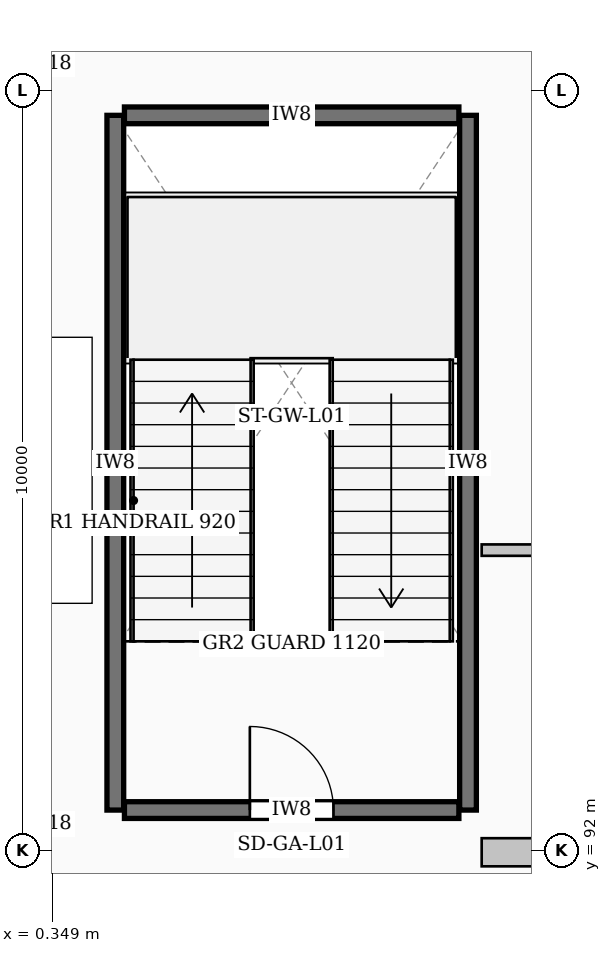
"""IFC4 building model, lengths in metres.
Left out: names, types, materials, properties, quantities, classifications, styles, units other than length and angle.
Written with IfcOpenShell. Run it as: python <this file> out.ifc"""

import sys

from ifc_helpers import new_model, si_unit, direction, frame, frame_2d, origin, place, context, subcontext, project, spatial, rectangle, extrude, element, fill, save


model = new_model("IFC4")
c1 = context("Model", 3, precision=1e-05, world=origin(), true_north=direction((0.0, 1.0)))
c2 = subcontext(c1, "Body", "Model", "MODEL_VIEW")
j1 = project(units=[si_unit("LENGTHUNIT", "METRE"), si_unit("PLANEANGLEUNIT", "RADIAN")], contexts=[c1])
p1 = place(None, origin())
s1 = spatial("IfcSite", under=j1, at=p1, CompositionType="ELEMENT")
p2 = place(p1, origin())
s2 = spatial("IfcBuilding", under=s1, at=p2, CompositionType="ELEMENT")
p3 = place(p2, frame((0.0, 0.0, 4.8)))
s3 = spatial("IfcBuildingStorey", under=s2, at=p3, CompositionType="ELEMENT", Elevation=4.8)
for number, where, z_axis, x_axis in (
    (1, (1.18, 92.53, 0.0), (0.0, 0.0, 1.0), (0.0, 1.0, 0.0)),
    (2, (5.82, 92.53, 0.0), (0.0, 0.0, 1.0), (0.0, 1.0, 0.0)),
):
    element("IfcWall", number, at=place(p3, frame(where, z_axis=z_axis, x_axis=x_axis)), inside=s3, PredefinedType="SHEAR", context=c2, shape_type="SweptSolid", body=[
        extrude(rectangle(XDim=9.14, YDim=0.22, at=frame_2d((4.57, 0.0))), origin(), (0.0, 0.0, 1.0), 4.56),
    ])
p4 = place(p3, frame((1.3, 101.67, 0.0), z_axis=(0.0, 0.0, 1.0), x_axis=(1.0, 0.0, 0.0)))
e3 = element("IfcWall", 3, at=p4, inside=s3, PredefinedType="SHEAR", context=c2, shape_type="SweptSolid", body=[
    extrude(rectangle(XDim=4.4, YDim=0.22, at=frame_2d((2.2, 0.0))), origin(), (0.0, 0.0, 1.0), 4.56),
])
p5 = place(p3, frame((1.3, 92.53, 0.0), z_axis=(0.0, 0.0, 1.0), x_axis=(1.0, 0.0, 0.0)))
e4 = element("IfcWall", 4, at=p5, inside=s3, PredefinedType="SHEAR", context=c2, shape_type="SweptSolid", body=[
    extrude(rectangle(XDim=4.4, YDim=0.22, at=frame_2d((2.2, 0.0))), origin(), (0.0, 0.0, 1.0), 4.56),
])
p6 = place(p5, frame((1.65, 0.0, 0.0)))
e5 = element("IfcOpeningElement", 5, at=p6, cuts=e4, PredefinedType="OPENING", context=c2, shape_type="SweptSolid", body=[
    extrude(rectangle(XDim=1.1, YDim=2.2, at=frame_2d((0.55, 1.1))), frame((0.0, 0.12, 0.0), z_axis=(0.0, -1.0, 0.0), x_axis=(1.0, 0.0, 0.0)), (0.0, 0.0, 1.0), 0.24),
])
p7 = place(p3, frame((6.0, 91.975, 0.0), z_axis=(0.0, 0.0, 1.0), x_axis=(1.0, 0.0, 0.0)))
e6 = element("IfcWall", 6, at=p7, inside=s3, PredefinedType="PARTITIONING", context=c2, shape_type="SweptSolid", body=[
    extrude(rectangle(XDim=4.62, YDim=0.37, at=frame_2d((2.31, 0.0))), origin(), (0.0, 0.0, 1.0), 4.069),
])
p8 = place(p7, frame((1.01, 0.0, 0.0)))
e7 = element("IfcOpeningElement", 7, at=p8, cuts=e6, PredefinedType="OPENING", context=c2, shape_type="SweptSolid", body=[
    extrude(rectangle(XDim=2.6, YDim=2.8, at=frame_2d((1.3, 1.4))), frame((0.0, 0.195, 0.0), z_axis=(0.0, -1.0, 0.0), x_axis=(1.0, 0.0, 0.0)), (0.0, 0.0, 1.0), 0.39),
])
p9 = place(p3, frame((6.0, 95.95, 0.0), z_axis=(0.0, 0.0, 1.0), x_axis=(1.0, 0.0, 0.0)))
e8 = element("IfcWall", 8, at=p9, inside=s3, PredefinedType="PARTITIONING", context=c2, shape_type="SweptSolid", body=[
    extrude(rectangle(XDim=15.42, YDim=0.15, at=frame_2d((7.71, 0.0))), origin(), (0.0, 0.0, 1.0), 4.52),
])
p10 = place(p9, frame((7.18, 0.0, 0.0)))
e9 = element("IfcOpeningElement", 9, at=p10, cuts=e8, PredefinedType="OPENING", context=c2, shape_type="SweptSolid", body=[
    extrude(rectangle(XDim=1.06, YDim=2.22, at=frame_2d((0.53, 1.11))), frame((0.0, 0.085, 0.0), z_axis=(0.0, -1.0, 0.0), x_axis=(1.0, 0.0, 0.0)), (0.0, 0.0, 1.0), 0.17),
])
p11 = place(p6, origin())
e10 = element("IfcDoor", 10, at=p11, inside=s3, OperationType="SINGLE_SWING_LEFT", PredefinedType="DOOR", context=c2, shape_type="SweptSolid", body=[
    extrude(rectangle(XDim=1.1, YDim=2.2, at=frame_2d((0.55, 1.1))), frame((0.0, 0.025, 0.0), z_axis=(0.0, -1.0, 0.0), x_axis=(1.0, 0.0, 0.0)), (0.0, 0.0, 1.0), 0.05),
])
fill(e5, e10)
save(model, sys.argv[1])
